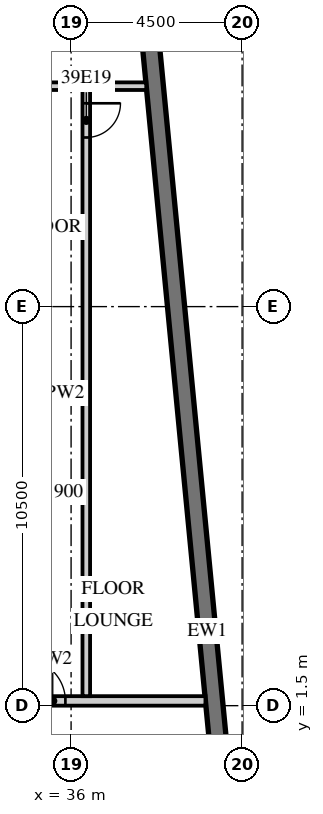
"""IFC4 building model, lengths in metres.
Left out: names, types, materials, properties, quantities, classifications, styles, units other than length and angle.
Written with IfcOpenShell. Run it as: python <this file> out.ifc"""

import sys

from ifc_helpers import new_model, si_unit, direction, frame, frame_2d, origin, place, context, subcontext, project, spatial, rectangle, extrude, element, fill, save


model = new_model("IFC4")
c1 = context("Model", 3, precision=1e-05, world=origin(), true_north=direction((0.0, 1.0)))
c2 = subcontext(c1, "Body", "Model", "MODEL_VIEW")
j1 = project(units=[si_unit("LENGTHUNIT", "METRE"), si_unit("PLANEANGLEUNIT", "RADIAN")], contexts=[c1])
p1 = place(None, origin())
s1 = spatial("IfcSite", under=j1, at=p1, CompositionType="ELEMENT")
p2 = place(p1, origin())
s2 = spatial("IfcBuilding", under=s1, at=p2, CompositionType="ELEMENT")
p3 = place(p2, frame((0.0, 0.0, 170.2)))
s3 = spatial("IfcBuildingStorey", under=s2, at=p3, CompositionType="ELEMENT", Elevation=170.2)
p4 = place(p3, frame((41.214, -13.466, 0.0), z_axis=(0.0, 0.0, 1.0), x_axis=(-0.095847314626, 0.995396047952, 0.0)))
e1 = element("IfcWall", 1, at=p4, inside=s3, PredefinedType="SOLIDWALL", context=c2, shape_type="SweptSolid", body=[
    extrude(rectangle(XDim=34.0, YDim=0.45, at=frame_2d((17.0, 0.0))), origin(), (0.0, 0.0, 1.0), 3.02),
])
p5 = place(p4, frame((3.869, 0.0, 0.45)))
e2 = element("IfcOpeningElement", 2, at=p5, cuts=e1, PredefinedType="OPENING", context=c2, shape_type="SweptSolid", body=[
    extrude(rectangle(XDim=3.3, YDim=2.25, at=frame_2d((1.65, 1.125))), frame((0.0, 0.235, 0.0), z_axis=(0.0, -1.0, 0.0), x_axis=(1.0, 0.0, 0.0)), (0.0, 0.0, 1.0), 0.47),
])
p6 = place(p4, frame((8.39, 0.0, 0.45)))
e3 = element("IfcOpeningElement", 3, at=p6, cuts=e1, PredefinedType="OPENING", context=c2, shape_type="SweptSolid", body=[
    extrude(rectangle(XDim=3.3, YDim=2.25, at=frame_2d((1.65, 1.125))), frame((0.0, 0.235, 0.0), z_axis=(0.0, -1.0, 0.0), x_axis=(1.0, 0.0, 0.0)), (0.0, 0.0, 1.0), 0.47),
])
p7 = place(p3, frame((31.5, 1.625, 0.0), z_axis=(0.0, 0.0, 1.0), x_axis=(1.0, 0.0, 0.0)))
e4 = element("IfcWall", 4, at=p7, inside=s3, PredefinedType="PARTITIONING", context=c2, shape_type="SweptSolid", body=[
    extrude(rectangle(XDim=8.035, YDim=0.25, at=frame_2d((4.018, 0.0))), origin(), (0.0, 0.0, 1.0), 3.02),
])
p8 = place(p7, frame((0.625, 0.0, 0.0)))
e5 = element("IfcOpeningElement", 5, at=p8, cuts=e4, PredefinedType="OPENING", context=c2, shape_type="SweptSolid", body=[
    extrude(rectangle(XDim=1.3, YDim=2.1, at=frame_2d((0.65, 1.05))), frame((0.0, 0.135, 0.0), z_axis=(0.0, -1.0, 0.0), x_axis=(1.0, 0.0, 0.0)), (0.0, 0.0, 1.0), 0.27),
])
p9 = place(p7, frame((3.25, 0.0, 0.0)))
e6 = element("IfcOpeningElement", 6, at=p9, cuts=e4, PredefinedType="OPENING", context=c2, shape_type="SweptSolid", body=[
    extrude(rectangle(XDim=1.1, YDim=2.1, at=frame_2d((0.55, 1.05))), frame((0.0, 0.135, 0.0), z_axis=(0.0, -1.0, 0.0), x_axis=(1.0, 0.0, 0.0)), (0.0, 0.0, 1.0), 0.27),
])
p10 = place(p3, frame((36.4, 1.75, 0.0), z_axis=(0.0, 0.0, 1.0), x_axis=(0.0, 1.0, 0.0)))
e7 = element("IfcWall", 7, at=p10, inside=s3, PredefinedType="PARTITIONING", context=c2, shape_type="SweptSolid", body=[
    extrude(rectangle(XDim=15.95, YDim=0.2, at=frame_2d((7.975, 0.0))), origin(), (0.0, 0.0, 1.0), 3.02),
])
p11 = place(p10, frame((14.7, 0.0, 0.0)))
e8 = element("IfcOpeningElement", 8, at=p11, cuts=e7, PredefinedType="OPENING", context=c2, shape_type="SweptSolid", body=[
    extrude(rectangle(XDim=0.9, YDim=2.1, at=frame_2d((0.45, 1.05))), frame((0.0, 0.11, 0.0), z_axis=(0.0, -1.0, 0.0), x_axis=(1.0, 0.0, 0.0)), (0.0, 0.0, 1.0), 0.22),
])
p12 = place(p3, frame((13.6, 17.8, 0.0), z_axis=(0.0, 0.0, 1.0), x_axis=(1.0, 0.0, 0.0)))
e9 = element("IfcWall", 9, at=p12, inside=s3, PredefinedType="PARTITIONING", context=c2, shape_type="SweptSolid", body=[
    extrude(rectangle(XDim=24.378, YDim=0.2, at=frame_2d((12.189, 0.0))), origin(), (0.0, 0.0, 1.0), 3.02),
])
p13 = place(p12, frame((16.613, 0.0, 0.0)))
e10 = element("IfcOpeningElement", 10, at=p13, cuts=e9, PredefinedType="OPENING", context=c2, shape_type="SweptSolid", body=[
    extrude(rectangle(XDim=0.9, YDim=2.1, at=frame_2d((0.45, 1.05))), frame((0.0, 0.11, 0.0), z_axis=(0.0, -1.0, 0.0), x_axis=(1.0, 0.0, 0.0)), (0.0, 0.0, 1.0), 0.22),
])
p14 = place(p12, frame((8.312, 0.0, 0.0)))
e11 = element("IfcOpeningElement", 11, at=p14, cuts=e9, PredefinedType="OPENING", context=c2, shape_type="SweptSolid", body=[
    extrude(rectangle(XDim=0.9, YDim=2.1, at=frame_2d((0.45, 1.05))), frame((0.0, 0.11, 0.0), z_axis=(0.0, -1.0, 0.0), x_axis=(1.0, 0.0, 0.0)), (0.0, 0.0, 1.0), 0.22),
])
p15 = place(p9, origin())
e12 = element("IfcDoor", 12, at=p15, inside=s3, OperationType="SINGLE_SWING_LEFT", PredefinedType="DOOR", context=c2, shape_type="SweptSolid", body=[
    extrude(rectangle(XDim=1.1, YDim=2.1, at=frame_2d((0.55, 1.05))), frame((0.0, 0.025, 0.0), z_axis=(0.0, -1.0, 0.0), x_axis=(1.0, 0.0, 0.0)), (0.0, 0.0, 1.0), 0.05),
])
fill(e6, e12)
p16 = place(p11, origin())
e13 = element("IfcDoor", 13, at=p16, inside=s3, OperationType="SINGLE_SWING_RIGHT", PredefinedType="DOOR", context=c2, shape_type="SweptSolid", body=[
    extrude(rectangle(XDim=0.9, YDim=2.1, at=frame_2d((0.45, 1.05))), frame((0.0, 0.025, 0.0), z_axis=(0.0, -1.0, 0.0), x_axis=(1.0, 0.0, 0.0)), (0.0, 0.0, 1.0), 0.05),
])
fill(e8, e13)
save(model, sys.argv[1])
